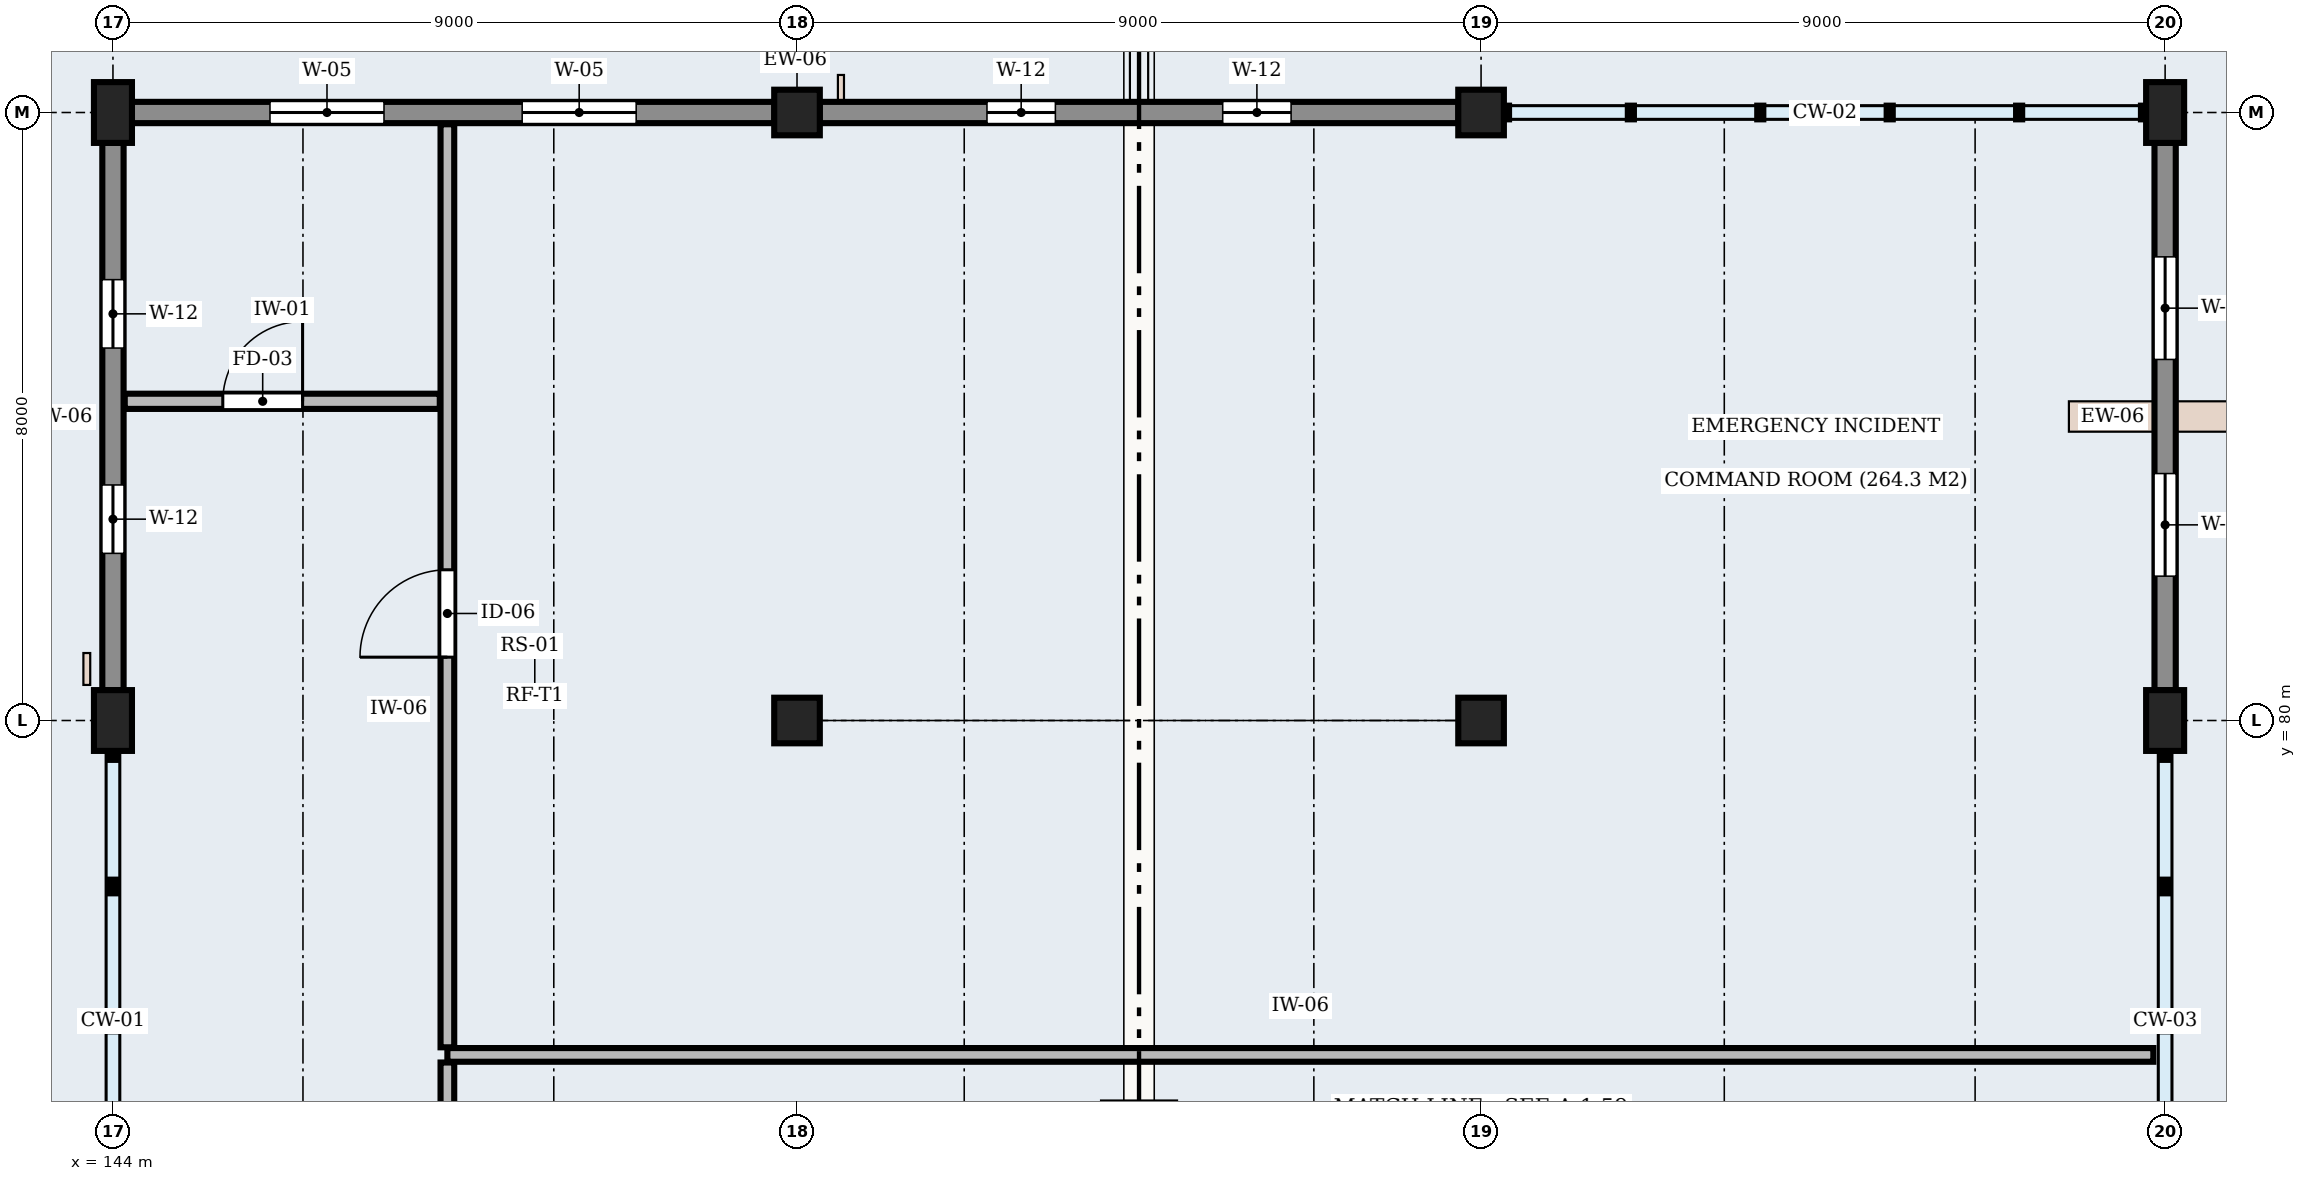
"""IFC4 building model, lengths in metres.
Left out: names, types, materials, properties, quantities, classifications, styles, units other than length and angle.
Written with IfcOpenShell. Run it as: python <this file> out.ifc"""

import sys

from ifc_helpers import new_model, si_unit, direction, frame, frame_2d, origin, origin_2d, place, context, subcontext, project, spatial, rectangle, extrude, element, fill, save


model = new_model("IFC4")
c1 = context("Model", 3, precision=1e-05, world=origin(), true_north=direction((0.0, 1.0)))
c2 = subcontext(c1, "Body", "Model", "MODEL_VIEW")
j1 = project(units=[si_unit("LENGTHUNIT", "METRE"), si_unit("PLANEANGLEUNIT", "RADIAN")], contexts=[c1])
p1 = place(None, origin())
s1 = spatial("IfcSite", under=j1, at=p1, CompositionType="ELEMENT")
p2 = place(p1, origin())
s2 = spatial("IfcBuilding", under=s1, at=p2, CompositionType="ELEMENT")
p3 = place(p2, frame((0.0, 0.0, 22.8)))
s3 = spatial("IfcBuildingStorey", under=s2, at=p3, CompositionType="ELEMENT", Elevation=22.8)
for number, where, z_axis, x_axis in (
    (1, (144.0, 80.0, 0.0), (0.0, 0.0, 1.0), (1.0, 0.0, 0.0)),
    (2, (144.0, 88.0, 0.0), (0.0, 0.0, 1.0), (1.0, 0.0, 0.0)),
):
    element("IfcColumn", number, at=place(p3, frame(where, z_axis=z_axis, x_axis=x_axis)), inside=s3, PredefinedType="COLUMN", context=c2, shape_type="SweptSolid", body=[
        extrude(rectangle(XDim=0.5, YDim=0.8, at=origin_2d()), origin(), (0.0, 0.0, 1.0), 4.2),
    ])
for number, where, z_axis, x_axis in (
    (3, (153.0, 80.0, 0.0), (0.0, 0.0, 1.0), (1.0, 0.0, 0.0)),
    (4, (153.0, 88.0, 0.0), (0.0, 0.0, 1.0), (1.0, 0.0, 0.0)),
    (5, (162.0, 80.0, 0.0), (0.0, 0.0, 1.0), (1.0, 0.0, 0.0)),
    (6, (162.0, 88.0, 0.0), (0.0, 0.0, 1.0), (1.0, 0.0, 0.0)),
):
    element("IfcColumn", number, at=place(p3, frame(where, z_axis=z_axis, x_axis=x_axis)), inside=s3, PredefinedType="COLUMN", context=c2, shape_type="SweptSolid", body=[
        extrude(rectangle(XDim=0.6, YDim=0.6, at=origin_2d()), origin(), (0.0, 0.0, 1.0), 6.58),
    ])
for number, where, z_axis, x_axis in (
    (7, (171.0, 80.0, 0.0), (0.0, 0.0, 1.0), (1.0, 0.0, 0.0)),
    (8, (171.0, 88.0, 0.0), (0.0, 0.0, 1.0), (1.0, 0.0, 0.0)),
):
    element("IfcColumn", number, at=place(p3, frame(where, z_axis=z_axis, x_axis=x_axis)), inside=s3, PredefinedType="COLUMN", context=c2, shape_type="SweptSolid", body=[
        extrude(rectangle(XDim=0.5, YDim=0.8, at=origin_2d()), origin(), (0.0, 0.0, 1.0), 4.2),
    ])
p4 = place(p3, frame((144.0, 80.398, 0.0), z_axis=(0.0, 0.0, 1.0), x_axis=(0.0, 1.0, 0.0)))
e9 = element("IfcWall", 9, at=p4, inside=s3, PredefinedType="STANDARD", context=c2, shape_type="SweptSolid", body=[
    extrude(rectangle(XDim=7.204, YDim=0.28, at=frame_2d((3.602, 0.0))), origin(), (0.0, 0.0, 1.0), 3.37),
])
p5 = place(p4, frame((1.801, 0.0, 0.9)))
e10 = element("IfcOpeningElement", 10, at=p5, cuts=e9, PredefinedType="OPENING", context=c2, shape_type="SweptSolid", body=[
    extrude(rectangle(XDim=0.9, YDim=2.2, at=frame_2d((0.45, 1.1))), frame((0.0, 0.152, 0.0), z_axis=(0.0, -1.0, 0.0), x_axis=(1.0, 0.0, 0.0)), (0.0, 0.0, 1.0), 0.304),
])
p6 = place(p4, frame((4.503, 0.0, 0.9)))
e11 = element("IfcOpeningElement", 11, at=p6, cuts=e9, PredefinedType="OPENING", context=c2, shape_type="SweptSolid", body=[
    extrude(rectangle(XDim=0.9, YDim=2.2, at=frame_2d((0.45, 1.1))), frame((0.0, 0.152, 0.0), z_axis=(0.0, -1.0, 0.0), x_axis=(1.0, 0.0, 0.0)), (0.0, 0.0, 1.0), 0.304),
])
p7 = place(p3, frame((144.248, 88.0, 0.0), z_axis=(0.0, 0.0, 1.0), x_axis=(1.0, 0.0, 0.0)))
e12 = element("IfcWall", 12, at=p7, inside=s3, PredefinedType="STANDARD", context=c2, shape_type="SweptSolid", body=[
    extrude(rectangle(XDim=8.454, YDim=0.28, at=frame_2d((4.227, 0.0))), origin(), (0.0, 0.0, 1.0), 3.37),
])
p8 = place(p7, frame((1.818, 0.0, 0.9)))
e13 = element("IfcOpeningElement", 13, at=p8, cuts=e12, PredefinedType="OPENING", context=c2, shape_type="SweptSolid", body=[
    extrude(rectangle(XDim=1.5, YDim=2.1, at=frame_2d((0.75, 1.05))), frame((0.0, 0.152, 0.0), z_axis=(0.0, -1.0, 0.0), x_axis=(1.0, 0.0, 0.0)), (0.0, 0.0, 1.0), 0.304),
])
p9 = place(p7, frame((5.136, 0.0, 0.9)))
e14 = element("IfcOpeningElement", 14, at=p9, cuts=e12, PredefinedType="OPENING", context=c2, shape_type="SweptSolid", body=[
    extrude(rectangle(XDim=1.5, YDim=2.1, at=frame_2d((0.75, 1.05))), frame((0.0, 0.152, 0.0), z_axis=(0.0, -1.0, 0.0), x_axis=(1.0, 0.0, 0.0)), (0.0, 0.0, 1.0), 0.304),
])
p10 = place(p3, frame((153.298, 88.0, 0.0), z_axis=(0.0, 0.0, 1.0), x_axis=(1.0, 0.0, 0.0)))
e15 = element("IfcWall", 15, at=p10, inside=s3, PredefinedType="STANDARD", context=c2, shape_type="SweptSolid", body=[
    extrude(rectangle(XDim=8.404, YDim=0.28, at=frame_2d((4.202, 0.0))), origin(), (0.0, 0.0, 1.0), 3.42),
])
p11 = place(p10, frame((2.201, 0.0, 0.9)))
e16 = element("IfcOpeningElement", 16, at=p11, cuts=e15, PredefinedType="OPENING", context=c2, shape_type="SweptSolid", body=[
    extrude(rectangle(XDim=0.9, YDim=2.2, at=frame_2d((0.45, 1.1))), frame((0.0, 0.152, 0.0), z_axis=(0.0, -1.0, 0.0), x_axis=(1.0, 0.0, 0.0)), (0.0, 0.0, 1.0), 0.304),
])
p12 = place(p10, frame((5.303, 0.0, 0.9)))
e17 = element("IfcOpeningElement", 17, at=p12, cuts=e15, PredefinedType="OPENING", context=c2, shape_type="SweptSolid", body=[
    extrude(rectangle(XDim=0.9, YDim=2.2, at=frame_2d((0.45, 1.1))), frame((0.0, 0.152, 0.0), z_axis=(0.0, -1.0, 0.0), x_axis=(1.0, 0.0, 0.0)), (0.0, 0.0, 1.0), 0.304),
])
p13 = place(p3, frame((171.0, 87.602, 0.0), z_axis=(0.0, 0.0, 1.0), x_axis=(0.0, -1.0, 0.0)))
e18 = element("IfcWall", 18, at=p13, inside=s3, PredefinedType="STANDARD", context=c2, shape_type="SweptSolid", body=[
    extrude(rectangle(XDim=7.204, YDim=0.28, at=frame_2d((3.602, 0.0))), origin(), (0.0, 0.0, 1.0), 3.37),
])
p14 = place(p13, frame((1.501, 0.0, 0.9)))
e19 = element("IfcOpeningElement", 19, at=p14, cuts=e18, PredefinedType="OPENING", context=c2, shape_type="SweptSolid", body=[
    extrude(rectangle(XDim=1.35, YDim=2.0, at=frame_2d((0.675, 1.0))), frame((0.0, 0.152, 0.0), z_axis=(0.0, -1.0, 0.0), x_axis=(1.0, 0.0, 0.0)), (0.0, 0.0, 1.0), 0.304),
])
p15 = place(p13, frame((4.353, 0.0, 0.9)))
e20 = element("IfcOpeningElement", 20, at=p15, cuts=e18, PredefinedType="OPENING", context=c2, shape_type="SweptSolid", body=[
    extrude(rectangle(XDim=1.35, YDim=2.0, at=frame_2d((0.675, 1.0))), frame((0.0, 0.152, 0.0), z_axis=(0.0, -1.0, 0.0), x_axis=(1.0, 0.0, 0.0)), (0.0, 0.0, 1.0), 0.304),
])
p16 = place(p3, frame((148.4, 75.6, 0.0), z_axis=(0.0, 0.0, 1.0), x_axis=(1.0, 0.0, 0.0)))
e21 = element("IfcWall", 21, at=p16, inside=s3, PredefinedType="STANDARD", context=c2, shape_type="SweptSolid", body=[
    extrude(rectangle(XDim=22.445, YDim=0.18, at=frame_2d((11.223, 0.0))), origin(), (0.0, 0.0, 1.0), 3.89),
])
p17 = place(p3, frame((148.4, 63.6, 0.0), z_axis=(0.0, 0.0, 1.0), x_axis=(0.0, 1.0, 0.0)))
e22 = element("IfcWall", 22, at=p17, inside=s3, PredefinedType="STANDARD", context=c2, shape_type="SweptSolid", body=[
    extrude(rectangle(XDim=11.9, YDim=0.18, at=frame_2d((5.95, 0.0))), origin(), (0.0, 0.0, 1.0), 3.89),
])
p18 = place(p17, frame((5.45, 0.0, 0.0)))
e23 = element("IfcOpeningElement", 23, at=p18, cuts=e22, PredefinedType="OPENING", context=c2, shape_type="SweptSolid", body=[
    extrude(rectangle(XDim=1.0, YDim=2.1, at=frame_2d((0.5, 1.05))), frame((0.0, 0.102, 0.0), z_axis=(0.0, -1.0, 0.0), x_axis=(1.0, 0.0, 0.0)), (0.0, 0.0, 1.0), 0.204),
])
p19 = place(p3, frame((148.4, 75.7, 0.0), z_axis=(0.0, 0.0, 1.0), x_axis=(0.0, 1.0, 0.0)))
e24 = element("IfcWall", 24, at=p19, inside=s3, PredefinedType="STANDARD", context=c2, shape_type="SweptSolid", body=[
    extrude(rectangle(XDim=12.145, YDim=0.18, at=frame_2d((6.073, 0.0))), origin(), (0.0, 0.0, 1.0), 3.89),
])
p20 = place(p19, frame((5.133, 0.0, 0.0)))
e25 = element("IfcOpeningElement", 25, at=p20, cuts=e24, PredefinedType="OPENING", context=c2, shape_type="SweptSolid", body=[
    extrude(rectangle(XDim=1.15, YDim=2.15, at=frame_2d((0.575, 1.075))), frame((0.0, 0.102, 0.0), z_axis=(0.0, -1.0, 0.0), x_axis=(1.0, 0.0, 0.0)), (0.0, 0.0, 1.0), 0.204),
])
p21 = place(p3, frame((144.155, 84.2, 0.0), z_axis=(0.0, 0.0, 1.0), x_axis=(1.0, 0.0, 0.0)))
e26 = element("IfcWall", 26, at=p21, inside=s3, PredefinedType="STANDARD", context=c2, shape_type="SweptSolid", body=[
    extrude(rectangle(XDim=4.145, YDim=0.2, at=frame_2d((2.073, 0.0))), origin(), (0.0, 0.0, 1.0), 3.89),
])
p22 = place(p21, frame((1.29, 0.0, 0.0)))
e27 = element("IfcOpeningElement", 27, at=p22, cuts=e26, PredefinedType="OPENING", context=c2, shape_type="SweptSolid", body=[
    extrude(rectangle(XDim=1.05, YDim=2.15, at=frame_2d((0.525, 1.075))), frame((0.0, 0.112, 0.0), z_axis=(0.0, -1.0, 0.0), x_axis=(1.0, 0.0, 0.0)), (0.0, 0.0, 1.0), 0.224),
])
p23 = place(p5, origin())
e28 = element("IfcWindow", 28, at=p23, inside=s3, PartitioningType="SINGLE_PANEL", PredefinedType="WINDOW", context=c2, shape_type="SweptSolid", body=[
    extrude(rectangle(XDim=0.9, YDim=2.2, at=frame_2d((0.45, 1.1))), frame((0.0, 0.03, 0.0), z_axis=(0.0, -1.0, 0.0), x_axis=(1.0, 0.0, 0.0)), (0.0, 0.0, 1.0), 0.06),
])
fill(e10, e28)
p24 = place(p6, origin())
e29 = element("IfcWindow", 29, at=p24, inside=s3, PartitioningType="SINGLE_PANEL", PredefinedType="WINDOW", context=c2, shape_type="SweptSolid", body=[
    extrude(rectangle(XDim=0.9, YDim=2.2, at=frame_2d((0.45, 1.1))), frame((0.0, 0.03, 0.0), z_axis=(0.0, -1.0, 0.0), x_axis=(1.0, 0.0, 0.0)), (0.0, 0.0, 1.0), 0.06),
])
fill(e11, e29)
p25 = place(p8, origin())
e30 = element("IfcWindow", 30, at=p25, inside=s3, PartitioningType="SINGLE_PANEL", PredefinedType="WINDOW", context=c2, shape_type="SweptSolid", body=[
    extrude(rectangle(XDim=1.5, YDim=2.1, at=frame_2d((0.75, 1.05))), frame((0.0, 0.03, 0.0), z_axis=(0.0, -1.0, 0.0), x_axis=(1.0, 0.0, 0.0)), (0.0, 0.0, 1.0), 0.06),
])
fill(e13, e30)
p26 = place(p9, origin())
e31 = element("IfcWindow", 31, at=p26, inside=s3, PartitioningType="SINGLE_PANEL", PredefinedType="WINDOW", context=c2, shape_type="SweptSolid", body=[
    extrude(rectangle(XDim=1.5, YDim=2.1, at=frame_2d((0.75, 1.05))), frame((0.0, 0.03, 0.0), z_axis=(0.0, -1.0, 0.0), x_axis=(1.0, 0.0, 0.0)), (0.0, 0.0, 1.0), 0.06),
])
fill(e14, e31)
p27 = place(p11, origin())
e32 = element("IfcWindow", 32, at=p27, inside=s3, PartitioningType="SINGLE_PANEL", PredefinedType="WINDOW", context=c2, shape_type="SweptSolid", body=[
    extrude(rectangle(XDim=0.9, YDim=2.2, at=frame_2d((0.45, 1.1))), frame((0.0, 0.03, 0.0), z_axis=(0.0, -1.0, 0.0), x_axis=(1.0, 0.0, 0.0)), (0.0, 0.0, 1.0), 0.06),
])
fill(e16, e32)
p28 = place(p12, origin())
e33 = element("IfcWindow", 33, at=p28, inside=s3, PartitioningType="SINGLE_PANEL", PredefinedType="WINDOW", context=c2, shape_type="SweptSolid", body=[
    extrude(rectangle(XDim=0.9, YDim=2.2, at=frame_2d((0.45, 1.1))), frame((0.0, 0.03, 0.0), z_axis=(0.0, -1.0, 0.0), x_axis=(1.0, 0.0, 0.0)), (0.0, 0.0, 1.0), 0.06),
])
fill(e17, e33)
p29 = place(p14, origin())
e34 = element("IfcWindow", 34, at=p29, inside=s3, PartitioningType="SINGLE_PANEL", PredefinedType="WINDOW", context=c2, shape_type="SweptSolid", body=[
    extrude(rectangle(XDim=1.35, YDim=2.0, at=frame_2d((0.675, 1.0))), frame((0.0, 0.03, 0.0), z_axis=(0.0, -1.0, 0.0), x_axis=(1.0, 0.0, 0.0)), (0.0, 0.0, 1.0), 0.06),
])
fill(e19, e34)
p30 = place(p15, origin())
e35 = element("IfcWindow", 35, at=p30, inside=s3, PartitioningType="SINGLE_PANEL", PredefinedType="WINDOW", context=c2, shape_type="SweptSolid", body=[
    extrude(rectangle(XDim=1.35, YDim=2.0, at=frame_2d((0.675, 1.0))), frame((0.0, 0.03, 0.0), z_axis=(0.0, -1.0, 0.0), x_axis=(1.0, 0.0, 0.0)), (0.0, 0.0, 1.0), 0.06),
])
fill(e20, e35)
p31 = place(p20, origin())
e36 = element("IfcDoor", 36, at=p31, inside=s3, OperationType="SINGLE_SWING_LEFT", PredefinedType="DOOR", context=c2, shape_type="SweptSolid", body=[
    extrude(rectangle(XDim=1.15, YDim=2.15, at=frame_2d((0.575, 1.075))), frame((0.0, 0.025, 0.0), z_axis=(0.0, -1.0, 0.0), x_axis=(1.0, 0.0, 0.0)), (0.0, 0.0, 1.0), 0.05),
])
fill(e25, e36)
p32 = place(p22, origin())
e37 = element("IfcDoor", 37, at=p32, inside=s3, OperationType="SINGLE_SWING_RIGHT", PredefinedType="DOOR", context=c2, shape_type="SweptSolid", body=[
    extrude(rectangle(XDim=1.05, YDim=2.15, at=frame_2d((0.525, 1.075))), frame((0.0, 0.025, 0.0), z_axis=(0.0, -1.0, 0.0), x_axis=(1.0, 0.0, 0.0)), (0.0, 0.0, 1.0), 0.05),
])
fill(e27, e37)
save(model, sys.argv[1])
